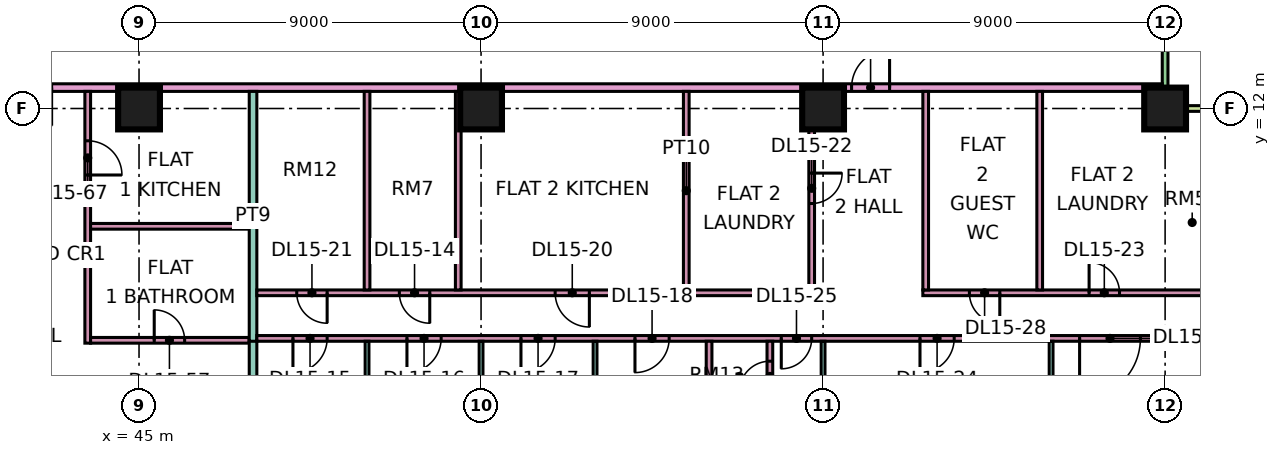
"""IFC4 building model, lengths in metres.
Left out: names, types, materials, properties, quantities, classifications, styles, units other than length and angle.
Written with IfcOpenShell. Run it as: python <this file> out.ifc"""

import sys

from ifc_helpers import new_model, si_unit, direction, frame, frame_2d, origin, origin_2d, place, context, subcontext, project, spatial, rectangle, extrude, element, fill, save


model = new_model("IFC4")
c1 = context("Model", 3, precision=1e-05, world=origin(), true_north=direction((0.0, 1.0)))
c2 = subcontext(c1, "Body", "Model", "MODEL_VIEW")
j1 = project(units=[si_unit("LENGTHUNIT", "METRE"), si_unit("PLANEANGLEUNIT", "RADIAN")], contexts=[c1])
p1 = place(None, origin())
s1 = spatial("IfcSite", under=j1, at=p1, CompositionType="ELEMENT")
p2 = place(p1, origin())
s2 = spatial("IfcBuilding", under=s1, at=p2, CompositionType="ELEMENT")
p3 = place(p2, frame((0.0, 0.0, 71.4)))
s3 = spatial("IfcBuildingStorey", under=s2, at=p3, CompositionType="ELEMENT", Elevation=71.4)
for number, where, z_axis, x_axis in (
    (1, (45.0, 12.0, 0.0), (0.0, 0.0, 1.0), (1.0, 0.0, 0.0)),
    (2, (54.0, 12.0, 0.0), (0.0, 0.0, 1.0), (1.0, 0.0, 0.0)),
    (3, (63.0, 12.0, 0.0), (0.0, 0.0, 1.0), (1.0, 0.0, 0.0)),
    (4, (72.0, 12.0, 0.0), (0.0, 0.0, 1.0), (1.0, 0.0, 0.0)),
):
    element("IfcColumn", number, at=place(p3, frame(where, z_axis=z_axis, x_axis=x_axis)), inside=s3, PredefinedType="COLUMN", context=c2, shape_type="SweptSolid", body=[
        extrude(rectangle(XDim=1.1, YDim=1.1, at=origin_2d()), origin(), (0.0, 0.0, 1.0), 3.75),
    ])
p4 = place(p3, frame((72.0, 12.075, 0.0), z_axis=(0.0, 0.0, 1.0), x_axis=(0.0, 1.0, 0.0)))
e5 = element("IfcWall", 5, at=p4, inside=s3, PredefinedType="SOLIDWALL", context=c2, shape_type="SweptSolid", body=[
    extrude(rectangle(XDim=10.35, YDim=0.15, at=frame_2d((5.175, 0.0))), origin(), (0.0, 0.0, 1.0), 3.35),
])
p5 = place(p4, frame((3.975, 0.0, 0.45)))
e6 = element("IfcOpeningElement", 6, at=p5, cuts=e5, PredefinedType="OPENING", context=c2, shape_type="SweptSolid", body=[
    extrude(rectangle(XDim=2.4, YDim=2.4, at=frame_2d((1.2, 1.2))), frame((0.0, 0.085, 0.0), z_axis=(0.0, -1.0, 0.0), x_axis=(1.0, 0.0, 0.0)), (0.0, 0.0, 1.0), 0.17),
])
p6 = place(p4, frame((8.587, 0.0, 0.45)))
e7 = element("IfcOpeningElement", 7, at=p6, cuts=e5, PredefinedType="OPENING", context=c2, shape_type="SweptSolid", body=[
    extrude(rectangle(XDim=1.2, YDim=2.4, at=frame_2d((0.6, 1.2))), frame((0.0, 0.085, 0.0), z_axis=(0.0, -1.0, 0.0), x_axis=(1.0, 0.0, 0.0)), (0.0, 0.0, 1.0), 0.17),
])
p7 = place(p3, frame((73.5, 12.0, 0.0), z_axis=(0.0, 0.0, 1.0), x_axis=(-1.0, 0.0, 0.0)))
e8 = element("IfcWall", 8, at=p7, inside=s3, PredefinedType="SOLIDWALL", context=c2, shape_type="SweptSolid", body=[
    extrude(rectangle(XDim=1.5, YDim=0.15, at=frame_2d((0.75, 0.0))), origin(), (0.0, 0.0, 1.0), 3.35),
])
p8 = place(p3, frame((40.65, 12.55, 0.0), z_axis=(0.0, 0.0, 1.0), x_axis=(1.0, 0.0, 0.0)))
e9 = element("IfcWall", 9, at=p8, inside=s3, PredefinedType="PARTITIONING", context=c2, shape_type="SweptSolid", body=[
    extrude(rectangle(XDim=31.276, YDim=0.2, at=frame_2d((15.638, 0.0))), origin(), (0.0, 0.0, 1.0), 3.35),
])
p9 = place(p8, frame((23.1, 0.0, 0.0)))
e10 = element("IfcOpeningElement", 10, at=p9, cuts=e9, PredefinedType="OPENING", context=c2, shape_type="SweptSolid", body=[
    extrude(rectangle(XDim=1.0, YDim=2.1, at=frame_2d((0.5, 1.05))), frame((0.0, 0.11, 0.0), z_axis=(0.0, -1.0, 0.0), x_axis=(1.0, 0.0, 0.0)), (0.0, 0.0, 1.0), 0.22),
])
p10 = place(p8, frame((1.05, 0.0, 0.0)))
e11 = element("IfcOpeningElement", 11, at=p10, cuts=e9, PredefinedType="OPENING", context=c2, shape_type="SweptSolid", body=[
    extrude(rectangle(XDim=1.0, YDim=2.1, at=frame_2d((0.5, 1.05))), frame((0.0, 0.11, 0.0), z_axis=(0.0, -1.0, 0.0), x_axis=(1.0, 0.0, 0.0)), (0.0, 0.0, 1.0), 0.22),
])
p11 = place(p3, frame((43.65, 5.825, 0.0), z_axis=(0.0, 0.0, 1.0), x_axis=(0.0, 1.0, 0.0)))
e12 = element("IfcWall", 12, at=p11, inside=s3, PredefinedType="PARTITIONING", context=c2, shape_type="SweptSolid", body=[
    extrude(rectangle(XDim=6.625, YDim=0.15, at=frame_2d((3.312, 0.0))), origin(), (0.0, 0.0, 1.0), 3.35),
])
p12 = place(p11, frame((4.425, 0.0, 0.0)))
e13 = element("IfcOpeningElement", 13, at=p12, cuts=e12, PredefinedType="OPENING", context=c2, shape_type="SweptSolid", body=[
    extrude(rectangle(XDim=0.9, YDim=2.1, at=frame_2d((0.45, 1.05))), frame((0.0, 0.085, 0.0), z_axis=(0.0, -1.0, 0.0), x_axis=(1.0, 0.0, 0.0)), (0.0, 0.0, 1.0), 0.17),
])
p13 = place(p3, frame((43.725, 5.9, 0.0), z_axis=(0.0, 0.0, 1.0), x_axis=(1.0, 0.0, 0.0)))
e14 = element("IfcWall", 14, at=p13, inside=s3, PredefinedType="PARTITIONING", context=c2, shape_type="SweptSolid", body=[
    extrude(rectangle(XDim=4.175, YDim=0.15, at=frame_2d((2.087, 0.0))), origin(), (0.0, 0.0, 1.0), 3.35),
])
p14 = place(p13, frame((1.675, 0.0, 0.0)))
e15 = element("IfcOpeningElement", 15, at=p14, cuts=e14, PredefinedType="OPENING", context=c2, shape_type="SweptSolid", body=[
    extrude(rectangle(XDim=0.8, YDim=2.1, at=frame_2d((0.4, 1.05))), frame((0.0, 0.085, 0.0), z_axis=(0.0, -1.0, 0.0), x_axis=(1.0, 0.0, 0.0)), (0.0, 0.0, 1.0), 0.17),
])
p15 = place(p3, frame((43.725, 8.9, 0.0), z_axis=(0.0, 0.0, 1.0), x_axis=(1.0, 0.0, 0.0)))
e16 = element("IfcWall", 16, at=p15, inside=s3, PredefinedType="PARTITIONING", context=c2, shape_type="SweptSolid", body=[
    extrude(rectangle(XDim=4.175, YDim=0.15, at=frame_2d((2.087, 0.0))), origin(), (0.0, 0.0, 1.0), 3.35),
])
p16 = place(p3, frame((48.0, 0.0, 0.0), z_axis=(0.0, 0.0, 1.0), x_axis=(0.0, 1.0, 0.0)))
e17 = element("IfcWall", 17, at=p16, inside=s3, PredefinedType="PARTITIONING", context=c2, shape_type="SweptSolid", body=[
    extrude(rectangle(XDim=5.975, YDim=0.2, at=frame_2d((2.988, 0.0))), origin(), (0.0, 0.0, 1.0), 3.35),
])
p17 = place(p3, frame((48.0, 5.875, 0.0), z_axis=(0.0, 0.0, 1.0), x_axis=(0.0, 1.0, 0.0)))
e18 = element("IfcWall", 18, at=p17, inside=s3, PredefinedType="PARTITIONING", context=c2, shape_type="SweptSolid", body=[
    extrude(rectangle(XDim=6.575, YDim=0.2, at=frame_2d((3.288, 0.0))), origin(), (0.0, 0.0, 1.0), 3.35),
])
p18 = place(p3, frame((48.1, 5.95, 0.0), z_axis=(0.0, 0.0, 1.0), x_axis=(1.0, 0.0, 0.0)))
e19 = element("IfcWall", 19, at=p18, inside=s3, PredefinedType="PARTITIONING", context=c2, shape_type="SweptSolid", body=[
    extrude(rectangle(XDim=25.25, YDim=0.15, at=frame_2d((12.625, 0.0))), origin(), (0.0, 0.0, 1.0), 3.35),
])
p19 = place(p18, frame((0.95, 0.0, 0.0)))
e20 = element("IfcOpeningElement", 20, at=p19, cuts=e19, PredefinedType="OPENING", context=c2, shape_type="SweptSolid", body=[
    extrude(rectangle(XDim=0.9, YDim=2.1, at=frame_2d((0.45, 1.05))), frame((0.0, 0.085, 0.0), z_axis=(0.0, -1.0, 0.0), x_axis=(1.0, 0.0, 0.0)), (0.0, 0.0, 1.0), 0.17),
])
p20 = place(p18, frame((3.95, 0.0, 0.0)))
e21 = element("IfcOpeningElement", 21, at=p20, cuts=e19, PredefinedType="OPENING", context=c2, shape_type="SweptSolid", body=[
    extrude(rectangle(XDim=0.9, YDim=2.1, at=frame_2d((0.45, 1.05))), frame((0.0, 0.085, 0.0), z_axis=(0.0, -1.0, 0.0), x_axis=(1.0, 0.0, 0.0)), (0.0, 0.0, 1.0), 0.17),
])
p21 = place(p18, frame((6.95, 0.0, 0.0)))
e22 = element("IfcOpeningElement", 22, at=p21, cuts=e19, PredefinedType="OPENING", context=c2, shape_type="SweptSolid", body=[
    extrude(rectangle(XDim=0.9, YDim=2.1, at=frame_2d((0.45, 1.05))), frame((0.0, 0.085, 0.0), z_axis=(0.0, -1.0, 0.0), x_axis=(1.0, 0.0, 0.0)), (0.0, 0.0, 1.0), 0.17),
])
p22 = place(p18, frame((9.95, 0.0, 0.0)))
e23 = element("IfcOpeningElement", 23, at=p22, cuts=e19, PredefinedType="OPENING", context=c2, shape_type="SweptSolid", body=[
    extrude(rectangle(XDim=0.9, YDim=2.1, at=frame_2d((0.45, 1.05))), frame((0.0, 0.085, 0.0), z_axis=(0.0, -1.0, 0.0), x_axis=(1.0, 0.0, 0.0)), (0.0, 0.0, 1.0), 0.17),
])
p23 = place(p18, frame((17.45, 0.0, 0.0)))
e24 = element("IfcOpeningElement", 24, at=p23, cuts=e19, PredefinedType="OPENING", context=c2, shape_type="SweptSolid", body=[
    extrude(rectangle(XDim=0.9, YDim=2.1, at=frame_2d((0.45, 1.05))), frame((0.0, 0.085, 0.0), z_axis=(0.0, -1.0, 0.0), x_axis=(1.0, 0.0, 0.0)), (0.0, 0.0, 1.0), 0.17),
])
p24 = place(p18, frame((13.8, 0.0, 0.0)))
e25 = element("IfcOpeningElement", 25, at=p24, cuts=e19, PredefinedType="OPENING", context=c2, shape_type="SweptSolid", body=[
    extrude(rectangle(XDim=0.8, YDim=2.1, at=frame_2d((0.4, 1.05))), frame((0.0, 0.085, 0.0), z_axis=(0.0, -1.0, 0.0), x_axis=(1.0, 0.0, 0.0)), (0.0, 0.0, 1.0), 0.17),
])
p25 = place(p18, frame((21.65, 0.0, 0.0)))
e26 = element("IfcOpeningElement", 26, at=p25, cuts=e19, PredefinedType="OPENING", context=c2, shape_type="SweptSolid", body=[
    extrude(rectangle(XDim=1.6, YDim=2.1, at=frame_2d((0.8, 1.05))), frame((0.0, 0.085, 0.0), z_axis=(0.0, -1.0, 0.0), x_axis=(1.0, 0.0, 0.0)), (0.0, 0.0, 1.0), 0.17),
])
p26 = place(p3, frame((48.1, 7.15, 0.0), z_axis=(0.0, 0.0, 1.0), x_axis=(1.0, 0.0, 0.0)))
e27 = element("IfcWall", 27, at=p26, inside=s3, PredefinedType="PARTITIONING", context=c2, shape_type="SweptSolid", body=[
    extrude(rectangle(XDim=14.675, YDim=0.15, at=frame_2d((7.337, 0.0))), origin(), (0.0, 0.0, 1.0), 3.35),
])
p27 = place(p26, frame((3.75, 0.0, 0.0)))
e28 = element("IfcOpeningElement", 28, at=p27, cuts=e27, PredefinedType="OPENING", context=c2, shape_type="SweptSolid", body=[
    extrude(rectangle(XDim=0.8, YDim=2.1, at=frame_2d((0.4, 1.05))), frame((0.0, 0.085, 0.0), z_axis=(0.0, -1.0, 0.0), x_axis=(1.0, 0.0, 0.0)), (0.0, 0.0, 1.0), 0.17),
])
p28 = place(p26, frame((7.85, 0.0, 0.0)))
e29 = element("IfcOpeningElement", 29, at=p28, cuts=e27, PredefinedType="OPENING", context=c2, shape_type="SweptSolid", body=[
    extrude(rectangle(XDim=0.9, YDim=2.1, at=frame_2d((0.45, 1.05))), frame((0.0, 0.085, 0.0), z_axis=(0.0, -1.0, 0.0), x_axis=(1.0, 0.0, 0.0)), (0.0, 0.0, 1.0), 0.17),
])
p29 = place(p26, frame((1.05, 0.0, 0.0)))
e30 = element("IfcOpeningElement", 30, at=p29, cuts=e27, PredefinedType="OPENING", context=c2, shape_type="SweptSolid", body=[
    extrude(rectangle(XDim=0.8, YDim=2.1, at=frame_2d((0.4, 1.05))), frame((0.0, 0.085, 0.0), z_axis=(0.0, -1.0, 0.0), x_axis=(1.0, 0.0, 0.0)), (0.0, 0.0, 1.0), 0.17),
])
p30 = place(p3, frame((51.0, -1.351, 0.0), z_axis=(0.0, 0.0, 1.0), x_axis=(0.0, 1.0, 0.0)))
e31 = element("IfcWall", 31, at=p30, inside=s3, PredefinedType="PARTITIONING", context=c2, shape_type="SweptSolid", body=[
    extrude(rectangle(XDim=7.226, YDim=0.1, at=frame_2d((3.613, 0.0))), origin(), (0.0, 0.0, 1.0), 3.35),
])
for number, where, z_axis, x_axis in (
    (32, (51.0, 7.225, 0.0), (0.0, 0.0, 1.0), (0.0, 1.0, 0.0)),
    (33, (53.4, 7.225, 0.0), (0.0, 0.0, 1.0), (0.0, 1.0, 0.0)),
):
    element("IfcWall", number, at=place(p3, frame(where, z_axis=z_axis, x_axis=x_axis)), inside=s3, PredefinedType="PARTITIONING", context=c2, shape_type="SweptSolid", body=[
        extrude(rectangle(XDim=5.225, YDim=0.15, at=frame_2d((2.612, 0.0))), origin(), (0.0, 0.0, 1.0), 3.35),
    ])
for number, where, z_axis, x_axis in (
    (34, (54.0, -1.351, 0.0), (0.0, 0.0, 1.0), (0.0, 1.0, 0.0)),
    (35, (57.0, -1.351, 0.0), (0.0, 0.0, 1.0), (0.0, 1.0, 0.0)),
):
    element("IfcWall", number, at=place(p3, frame(where, z_axis=z_axis, x_axis=x_axis)), inside=s3, PredefinedType="PARTITIONING", context=c2, shape_type="SweptSolid", body=[
        extrude(rectangle(XDim=7.226, YDim=0.1, at=frame_2d((3.613, 0.0))), origin(), (0.0, 0.0, 1.0), 3.35),
    ])
p31 = place(p3, frame((59.4, 7.225, 0.0), z_axis=(0.0, 0.0, 1.0), x_axis=(0.0, 1.0, 0.0)))
e36 = element("IfcWall", 36, at=p31, inside=s3, PredefinedType="PARTITIONING", context=c2, shape_type="SweptSolid", body=[
    extrude(rectangle(XDim=5.225, YDim=0.15, at=frame_2d((2.612, 0.0))), origin(), (0.0, 0.0, 1.0), 3.35),
])
p32 = place(p3, frame((60.0, 0.0, 0.0), z_axis=(0.0, 0.0, 1.0), x_axis=(0.0, 1.0, 0.0)))
e37 = element("IfcWall", 37, at=p32, inside=s3, PredefinedType="PARTITIONING", context=c2, shape_type="SweptSolid", body=[
    extrude(rectangle(XDim=5.875, YDim=0.15, at=frame_2d((2.938, 0.0))), origin(), (0.0, 0.0, 1.0), 3.35),
])
p33 = place(p3, frame((61.6, 3.875, 0.0), z_axis=(0.0, 0.0, 1.0), x_axis=(0.0, 1.0, 0.0)))
e38 = element("IfcWall", 38, at=p33, inside=s3, PredefinedType="PARTITIONING", context=c2, shape_type="SweptSolid", body=[
    extrude(rectangle(XDim=2.0, YDim=0.15, at=frame_2d((1.0, 0.0))), origin(), (0.0, 0.0, 1.0), 3.35),
])
p34 = place(p33, frame((0.675, 0.0, 0.0)))
e39 = element("IfcOpeningElement", 39, at=p34, cuts=e38, PredefinedType="OPENING", context=c2, shape_type="SweptSolid", body=[
    extrude(rectangle(XDim=0.8, YDim=2.1, at=frame_2d((0.4, 1.05))), frame((0.0, 0.085, 0.0), z_axis=(0.0, -1.0, 0.0), x_axis=(1.0, 0.0, 0.0)), (0.0, 0.0, 1.0), 0.17),
])
p35 = place(p3, frame((62.7, 7.225, 0.0), z_axis=(0.0, 0.0, 1.0), x_axis=(0.0, 1.0, 0.0)))
e40 = element("IfcWall", 40, at=p35, inside=s3, PredefinedType="PARTITIONING", context=c2, shape_type="SweptSolid", body=[
    extrude(rectangle(XDim=5.225, YDim=0.15, at=frame_2d((2.612, 0.0))), origin(), (0.0, 0.0, 1.0), 3.35),
])
p36 = place(p35, frame((2.275, 0.0, 0.0)))
e41 = element("IfcOpeningElement", 41, at=p36, cuts=e40, PredefinedType="OPENING", context=c2, shape_type="SweptSolid", body=[
    extrude(rectangle(XDim=0.8, YDim=2.1, at=frame_2d((0.4, 1.05))), frame((0.0, 0.085, 0.0), z_axis=(0.0, -1.0, 0.0), x_axis=(1.0, 0.0, 0.0)), (0.0, 0.0, 1.0), 0.17),
])
p37 = place(p3, frame((63.0, 0.074, 0.0), z_axis=(0.0, 0.0, 1.0), x_axis=(0.0, 1.0, 0.0)))
e42 = element("IfcWall", 42, at=p37, inside=s3, PredefinedType="PARTITIONING", context=c2, shape_type="SweptSolid", body=[
    extrude(rectangle(XDim=5.801, YDim=0.1, at=frame_2d((2.9, 0.0))), origin(), (0.0, 0.0, 1.0), 3.35),
])
p38 = place(p3, frame((65.625, 7.15, 0.0), z_axis=(0.0, 0.0, 1.0), x_axis=(1.0, 0.0, 0.0)))
e43 = element("IfcWall", 43, at=p38, inside=s3, PredefinedType="PARTITIONING", context=c2, shape_type="SweptSolid", body=[
    extrude(rectangle(XDim=7.725, YDim=0.15, at=frame_2d((3.863, 0.0))), origin(), (0.0, 0.0, 1.0), 3.35),
])
p39 = place(p38, frame((4.375, 0.0, 0.0)))
e44 = element("IfcOpeningElement", 44, at=p39, cuts=e43, PredefinedType="OPENING", context=c2, shape_type="SweptSolid", body=[
    extrude(rectangle(XDim=0.8, YDim=2.1, at=frame_2d((0.4, 1.05))), frame((0.0, 0.085, 0.0), z_axis=(0.0, -1.0, 0.0), x_axis=(1.0, 0.0, 0.0)), (0.0, 0.0, 1.0), 0.17),
])
p40 = place(p38, frame((1.225, 0.0, 0.0)))
e45 = element("IfcOpeningElement", 45, at=p40, cuts=e43, PredefinedType="OPENING", context=c2, shape_type="SweptSolid", body=[
    extrude(rectangle(XDim=0.8, YDim=2.1, at=frame_2d((0.4, 1.05))), frame((0.0, 0.085, 0.0), z_axis=(0.0, -1.0, 0.0), x_axis=(1.0, 0.0, 0.0)), (0.0, 0.0, 1.0), 0.17),
])
for number, where, z_axis, x_axis in (
    (46, (65.7, 7.225, 0.0), (0.0, 0.0, 1.0), (0.0, 1.0, 0.0)),
    (47, (68.7, 7.225, 0.0), (0.0, 0.0, 1.0), (0.0, 1.0, 0.0)),
):
    element("IfcWall", number, at=place(p3, frame(where, z_axis=z_axis, x_axis=x_axis)), inside=s3, PredefinedType="PARTITIONING", context=c2, shape_type="SweptSolid", body=[
        extrude(rectangle(XDim=5.225, YDim=0.15, at=frame_2d((2.612, 0.0))), origin(), (0.0, 0.0, 1.0), 3.35),
    ])
p41 = place(p3, frame((69.0, 0.074, 0.0), z_axis=(0.0, 0.0, 1.0), x_axis=(0.0, 1.0, 0.0)))
e48 = element("IfcWall", 48, at=p41, inside=s3, PredefinedType="PARTITIONING", context=c2, shape_type="SweptSolid", body=[
    extrude(rectangle(XDim=5.801, YDim=0.1, at=frame_2d((2.9, 0.0))), origin(), (0.0, 0.0, 1.0), 3.35),
])
p42 = place(p27, origin())
e49 = element("IfcDoor", 49, at=p42, inside=s3, OperationType="SINGLE_SWING_RIGHT", PredefinedType="DOOR", context=c2, shape_type="SweptSolid", body=[
    extrude(rectangle(XDim=0.8, YDim=2.1, at=frame_2d((0.4, 1.05))), frame((0.0, 0.025, 0.0), z_axis=(0.0, -1.0, 0.0), x_axis=(1.0, 0.0, 0.0)), (0.0, 0.0, 1.0), 0.05),
])
fill(e28, e49)
p43 = place(p19, frame((0.9, 0.0, 0.0), z_axis=(0.0, 0.0, 1.0), x_axis=(-1.0, 0.0, 0.0)))
e50 = element("IfcDoor", 50, at=p43, inside=s3, OperationType="SINGLE_SWING_LEFT", PredefinedType="DOOR", context=c2, shape_type="SweptSolid", body=[
    extrude(rectangle(XDim=0.9, YDim=2.1, at=frame_2d((0.45, 1.05))), frame((0.0, 0.025, 0.0), z_axis=(0.0, -1.0, 0.0), x_axis=(1.0, 0.0, 0.0)), (0.0, 0.0, 1.0), 0.05),
])
fill(e20, e50)
p44 = place(p20, frame((0.9, 0.0, 0.0), z_axis=(0.0, 0.0, 1.0), x_axis=(-1.0, 0.0, 0.0)))
e51 = element("IfcDoor", 51, at=p44, inside=s3, OperationType="SINGLE_SWING_LEFT", PredefinedType="DOOR", context=c2, shape_type="SweptSolid", body=[
    extrude(rectangle(XDim=0.9, YDim=2.1, at=frame_2d((0.45, 1.05))), frame((0.0, 0.025, 0.0), z_axis=(0.0, -1.0, 0.0), x_axis=(1.0, 0.0, 0.0)), (0.0, 0.0, 1.0), 0.05),
])
fill(e21, e51)
p45 = place(p21, frame((0.9, 0.0, 0.0), z_axis=(0.0, 0.0, 1.0), x_axis=(-1.0, 0.0, 0.0)))
e52 = element("IfcDoor", 52, at=p45, inside=s3, OperationType="SINGLE_SWING_LEFT", PredefinedType="DOOR", context=c2, shape_type="SweptSolid", body=[
    extrude(rectangle(XDim=0.9, YDim=2.1, at=frame_2d((0.45, 1.05))), frame((0.0, 0.025, 0.0), z_axis=(0.0, -1.0, 0.0), x_axis=(1.0, 0.0, 0.0)), (0.0, 0.0, 1.0), 0.05),
])
fill(e22, e52)
p46 = place(p22, frame((0.9, 0.0, 0.0), z_axis=(0.0, 0.0, 1.0), x_axis=(-1.0, 0.0, 0.0)))
e53 = element("IfcDoor", 53, at=p46, inside=s3, OperationType="SINGLE_SWING_LEFT", PredefinedType="DOOR", context=c2, shape_type="SweptSolid", body=[
    extrude(rectangle(XDim=0.9, YDim=2.1, at=frame_2d((0.45, 1.05))), frame((0.0, 0.025, 0.0), z_axis=(0.0, -1.0, 0.0), x_axis=(1.0, 0.0, 0.0)), (0.0, 0.0, 1.0), 0.05),
])
fill(e23, e53)
p47 = place(p9, frame((1.0, 0.0, 0.0), z_axis=(0.0, 0.0, 1.0), x_axis=(-1.0, 0.0, 0.0)))
e54 = element("IfcDoor", 54, at=p47, inside=s3, OperationType="SINGLE_SWING_RIGHT", PredefinedType="DOOR", context=c2, shape_type="SweptSolid", body=[
    extrude(rectangle(XDim=1.0, YDim=2.1, at=frame_2d((0.5, 1.05))), frame((0.0, 0.025, 0.0), z_axis=(0.0, -1.0, 0.0), x_axis=(1.0, 0.0, 0.0)), (0.0, 0.0, 1.0), 0.05),
])
fill(e10, e54)
p48 = place(p28, origin())
e55 = element("IfcDoor", 55, at=p48, inside=s3, OperationType="SINGLE_SWING_RIGHT", PredefinedType="DOOR", context=c2, shape_type="SweptSolid", body=[
    extrude(rectangle(XDim=0.9, YDim=2.1, at=frame_2d((0.45, 1.05))), frame((0.0, 0.025, 0.0), z_axis=(0.0, -1.0, 0.0), x_axis=(1.0, 0.0, 0.0)), (0.0, 0.0, 1.0), 0.05),
])
fill(e29, e55)
p49 = place(p29, origin())
e56 = element("IfcDoor", 56, at=p49, inside=s3, OperationType="SINGLE_SWING_RIGHT", PredefinedType="DOOR", context=c2, shape_type="SweptSolid", body=[
    extrude(rectangle(XDim=0.8, YDim=2.1, at=frame_2d((0.4, 1.05))), frame((0.0, 0.025, 0.0), z_axis=(0.0, -1.0, 0.0), x_axis=(1.0, 0.0, 0.0)), (0.0, 0.0, 1.0), 0.05),
])
fill(e30, e56)
p50 = place(p36, origin())
e57 = element("IfcDoor", 57, at=p50, inside=s3, OperationType="SINGLE_SWING_RIGHT", PredefinedType="DOOR", context=c2, shape_type="SweptSolid", body=[
    extrude(rectangle(XDim=0.8, YDim=2.1, at=frame_2d((0.4, 1.05))), frame((0.0, 0.025, 0.0), z_axis=(0.0, -1.0, 0.0), x_axis=(1.0, 0.0, 0.0)), (0.0, 0.0, 1.0), 0.05),
])
fill(e41, e57)
p51 = place(p39, origin())
e58 = element("IfcDoor", 58, at=p51, inside=s3, OperationType="SINGLE_SWING_LEFT", PredefinedType="DOOR", context=c2, shape_type="SweptSolid", body=[
    extrude(rectangle(XDim=0.8, YDim=2.1, at=frame_2d((0.4, 1.05))), frame((0.0, 0.025, 0.0), z_axis=(0.0, -1.0, 0.0), x_axis=(1.0, 0.0, 0.0)), (0.0, 0.0, 1.0), 0.05),
])
fill(e44, e58)
p52 = place(p23, frame((0.9, 0.0, 0.0), z_axis=(0.0, 0.0, 1.0), x_axis=(-1.0, 0.0, 0.0)))
e59 = element("IfcDoor", 59, at=p52, inside=s3, OperationType="SINGLE_SWING_LEFT", PredefinedType="DOOR", context=c2, shape_type="SweptSolid", body=[
    extrude(rectangle(XDim=0.9, YDim=2.1, at=frame_2d((0.45, 1.05))), frame((0.0, 0.025, 0.0), z_axis=(0.0, -1.0, 0.0), x_axis=(1.0, 0.0, 0.0)), (0.0, 0.0, 1.0), 0.05),
])
fill(e24, e59)
p53 = place(p24, frame((0.8, 0.0, 0.0), z_axis=(0.0, 0.0, 1.0), x_axis=(-1.0, 0.0, 0.0)))
e60 = element("IfcDoor", 60, at=p53, inside=s3, OperationType="SINGLE_SWING_LEFT", PredefinedType="DOOR", context=c2, shape_type="SweptSolid", body=[
    extrude(rectangle(XDim=0.8, YDim=2.1, at=frame_2d((0.4, 1.05))), frame((0.0, 0.025, 0.0), z_axis=(0.0, -1.0, 0.0), x_axis=(1.0, 0.0, 0.0)), (0.0, 0.0, 1.0), 0.05),
])
fill(e25, e60)
p54 = place(p34, origin())
e61 = element("IfcDoor", 61, at=p54, inside=s3, OperationType="SINGLE_SWING_LEFT", PredefinedType="DOOR", context=c2, shape_type="SweptSolid", body=[
    extrude(rectangle(XDim=0.8, YDim=2.1, at=frame_2d((0.4, 1.05))), frame((0.0, 0.025, 0.0), z_axis=(0.0, -1.0, 0.0), x_axis=(1.0, 0.0, 0.0)), (0.0, 0.0, 1.0), 0.05),
])
fill(e39, e61)
p55 = place(p25, frame((1.6, 0.0, 0.0), z_axis=(0.0, 0.0, 1.0), x_axis=(-1.0, 0.0, 0.0)))
e62 = element("IfcDoor", 62, at=p55, inside=s3, OperationType="DOUBLE_DOOR_SINGLE_SWING", PredefinedType="DOOR", context=c2, shape_type="SweptSolid", body=[
    extrude(rectangle(XDim=1.6, YDim=2.1, at=frame_2d((0.8, 1.05))), frame((0.0, 0.025, 0.0), z_axis=(0.0, -1.0, 0.0), x_axis=(1.0, 0.0, 0.0)), (0.0, 0.0, 1.0), 0.05),
])
fill(e26, e62)
p56 = place(p40, origin())
e63 = element("IfcDoor", 63, at=p56, inside=s3, OperationType="SINGLE_SWING_RIGHT", PredefinedType="DOOR", context=c2, shape_type="SweptSolid", body=[
    extrude(rectangle(XDim=0.8, YDim=2.1, at=frame_2d((0.4, 1.05))), frame((0.0, 0.025, 0.0), z_axis=(0.0, -1.0, 0.0), x_axis=(1.0, 0.0, 0.0)), (0.0, 0.0, 1.0), 0.05),
])
fill(e45, e63)
p57 = place(p14, origin())
e64 = element("IfcDoor", 64, at=p57, inside=s3, OperationType="SINGLE_SWING_LEFT", PredefinedType="DOOR", context=c2, shape_type="SweptSolid", body=[
    extrude(rectangle(XDim=0.8, YDim=2.1, at=frame_2d((0.4, 1.05))), frame((0.0, 0.025, 0.0), z_axis=(0.0, -1.0, 0.0), x_axis=(1.0, 0.0, 0.0)), (0.0, 0.0, 1.0), 0.05),
])
fill(e15, e64)
p58 = place(p12, frame((0.9, 0.0, 0.0), z_axis=(0.0, 0.0, 1.0), x_axis=(-1.0, 0.0, 0.0)))
e65 = element("IfcDoor", 65, at=p58, inside=s3, OperationType="SINGLE_SWING_LEFT", PredefinedType="DOOR", context=c2, shape_type="SweptSolid", body=[
    extrude(rectangle(XDim=0.9, YDim=2.1, at=frame_2d((0.45, 1.05))), frame((0.0, 0.025, 0.0), z_axis=(0.0, -1.0, 0.0), x_axis=(1.0, 0.0, 0.0)), (0.0, 0.0, 1.0), 0.05),
])
fill(e13, e65)
save(model, sys.argv[1])
